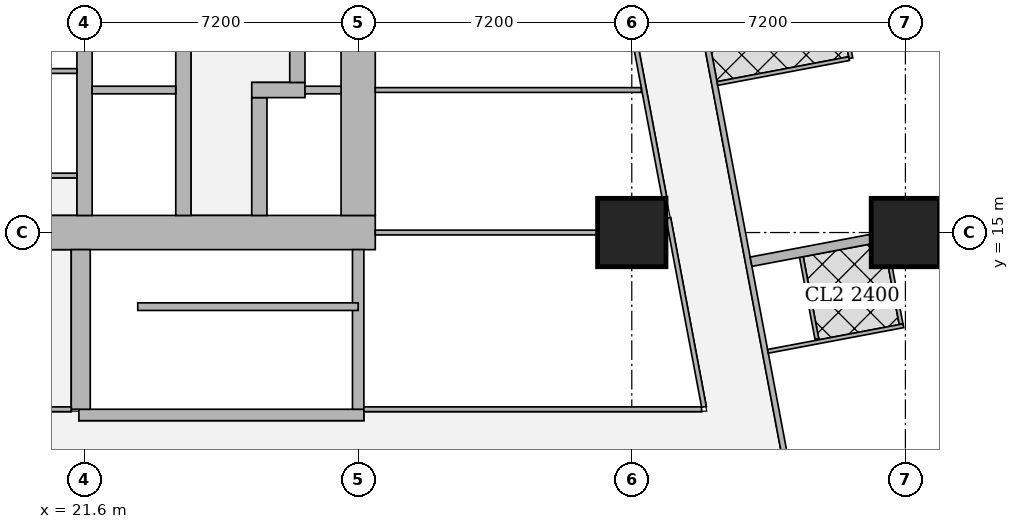
"""IFC4 building model, lengths in metres.
Left out: names, types, materials, properties, quantities, classifications, styles, units other than length and angle.
Written with IfcOpenShell. Run it as: python <this file> out.ifc"""

import sys

from ifc_helpers import new_model, si_unit, direction, frame, frame_2d, origin, origin_2d, place, context, subcontext, project, spatial, rectangle, extrude, element, fill, save


model = new_model("IFC4")
c1 = context("Model", 3, precision=1e-05, world=origin(), true_north=direction((0.0, 1.0)))
c2 = subcontext(c1, "Body", "Model", "MODEL_VIEW")
j1 = project(units=[si_unit("LENGTHUNIT", "METRE"), si_unit("PLANEANGLEUNIT", "RADIAN")], contexts=[c1])
p1 = place(None, origin())
s1 = spatial("IfcSite", under=j1, at=p1, CompositionType="ELEMENT")
p2 = place(p1, origin())
s2 = spatial("IfcBuilding", under=s1, at=p2, CompositionType="ELEMENT")
p3 = place(p2, frame((0.0, 0.0, 20.0)))
s3 = spatial("IfcBuildingStorey", under=s2, at=p3, CompositionType="ELEMENT", Elevation=20.0)
for number, where, z_axis, x_axis in (
    (1, (36.0, 15.0, 0.0), (0.0, 0.0, 1.0), (1.0, 0.0, 0.0)),
    (2, (43.2, 15.0, 0.0), (0.0, 0.0, 1.0), (1.0, 0.0, 0.0)),
):
    element("IfcColumn", number, at=place(p3, frame(where, z_axis=z_axis, x_axis=x_axis)), inside=s3, PredefinedType="COLUMN", context=c2, shape_type="SweptSolid", body=[
        extrude(rectangle(XDim=1.8, YDim=1.8, at=origin_2d()), origin(), (0.0, 0.0, 1.0), 3.75),
    ])
p4 = place(p3, frame((13.95, 15.0, 0.0), z_axis=(0.0, 0.0, 1.0), x_axis=(1.0, 0.0, 0.0)))
e3 = element("IfcWall", 3, at=p4, inside=s3, PredefinedType="SHEAR", context=c2, shape_type="SweptSolid", body=[
    extrude(rectangle(XDim=15.3, YDim=0.9, at=frame_2d((7.65, 0.0))), origin(), (0.0, 0.0, 1.0), 3.75),
])
p5 = place(p4, frame((4.45, 0.0, 0.0)))
e4 = element("IfcOpeningElement", 4, at=p5, cuts=e3, PredefinedType="OPENING", context=c2, shape_type="SweptSolid", body=[
    extrude(rectangle(XDim=1.8, YDim=2.1, at=frame_2d((0.9, 1.05))), frame((0.0, 0.46, 0.0), z_axis=(0.0, -1.0, 0.0), x_axis=(1.0, 0.0, 0.0)), (0.0, 0.0, 1.0), 0.92),
])
p6 = place(p4, frame((10.7, 0.0, 0.0)))
e5 = element("IfcOpeningElement", 5, at=p6, cuts=e3, PredefinedType="OPENING", context=c2, shape_type="SweptSolid", body=[
    extrude(rectangle(XDim=1.1, YDim=2.1, at=frame_2d((0.55, 1.05))), frame((0.0, 0.46, 0.0), z_axis=(0.0, -1.0, 0.0), x_axis=(1.0, 0.0, 0.0)), (0.0, 0.0, 1.0), 0.92),
])
p7 = place(p3, frame((28.8, 15.45, 0.0), z_axis=(0.0, 0.0, 1.0), x_axis=(0.0, 1.0, 0.0)))
e6 = element("IfcWall", 6, at=p7, inside=s3, PredefinedType="SHEAR", context=c2, shape_type="SweptSolid", body=[
    extrude(rectangle(XDim=14.1, YDim=0.9, at=frame_2d((7.05, 0.0))), origin(), (0.0, 0.0, 1.0), 3.75),
])
for number, where, z_axis, x_axis in (
    (7, (21.6, 15.45, 0.0), (0.0, 0.0, 1.0), (0.0, 1.0, 0.0)),
    (8, (24.2, 15.45, 0.0), (0.0, 0.0, 1.0), (0.0, 1.0, 0.0)),
):
    element("IfcWall", number, at=place(p3, frame(where, z_axis=z_axis, x_axis=x_axis)), inside=s3, PredefinedType="SHEAR", context=c2, shape_type="SweptSolid", body=[
        extrude(rectangle(XDim=14.1, YDim=0.4, at=frame_2d((7.05, 0.0))), origin(), (0.0, 0.0, 1.0), 3.75),
    ])
p8 = place(p3, frame((26.2, 15.45, 0.0), z_axis=(0.0, 0.0, 1.0), x_axis=(0.0, 1.0, 0.0)))
e9 = element("IfcWall", 9, at=p8, inside=s3, PredefinedType="SHEAR", context=c2, shape_type="SweptSolid", body=[
    extrude(rectangle(XDim=3.1, YDim=0.4, at=frame_2d((1.55, 0.0))), origin(), (0.0, 0.0, 1.0), 3.75),
])
p9 = place(p8, frame((0.825, 0.0, 0.0)))
e10 = element("IfcOpeningElement", 10, at=p9, cuts=e9, PredefinedType="OPENING", context=c2, shape_type="SweptSolid", body=[
    extrude(rectangle(XDim=1.2, YDim=2.1, at=frame_2d((0.6, 1.05))), frame((0.0, 0.21, 0.0), z_axis=(0.0, -1.0, 0.0), x_axis=(1.0, 0.0, 0.0)), (0.0, 0.0, 1.0), 0.42),
])
p10 = place(p3, frame((26.0, 18.75, 0.0), z_axis=(0.0, 0.0, 1.0), x_axis=(1.0, 0.0, 0.0)))
e11 = element("IfcWall", 11, at=p10, inside=s3, PredefinedType="SHEAR", context=c2, shape_type="SweptSolid", body=[
    extrude(rectangle(XDim=1.4, YDim=0.4, at=frame_2d((0.7, 0.0))), origin(), (0.0, 0.0, 1.0), 3.75),
])
p11 = place(p3, frame((27.2, 18.95, 0.0), z_axis=(0.0, 0.0, 1.0), x_axis=(0.0, 1.0, 0.0)))
e12 = element("IfcWall", 12, at=p11, inside=s3, PredefinedType="SHEAR", context=c2, shape_type="SweptSolid", body=[
    extrude(rectangle(XDim=7.1, YDim=0.4, at=frame_2d((3.55, 0.0))), origin(), (0.0, 0.0, 1.0), 3.75),
])
p12 = place(p3, frame((21.45, 10.2, 0.0), z_axis=(0.0, 0.0, 1.0), x_axis=(1.0, 0.0, 0.0)))
e13 = element("IfcWall", 13, at=p12, inside=s3, PredefinedType="SHEAR", context=c2, shape_type="SweptSolid", body=[
    extrude(rectangle(XDim=7.5, YDim=0.3, at=frame_2d((3.75, 0.0))), origin(), (0.0, 0.0, 1.0), 3.75),
])
p13 = place(p12, frame((0.5, 0.0, 0.0)))
e14 = element("IfcOpeningElement", 14, at=p13, cuts=e13, PredefinedType="OPENING", context=c2, shape_type="SweptSolid", body=[
    extrude(rectangle(XDim=1.1, YDim=2.1, at=frame_2d((0.55, 1.05))), frame((0.0, 0.16, 0.0), z_axis=(0.0, -1.0, 0.0), x_axis=(1.0, 0.0, 0.0)), (0.0, 0.0, 1.0), 0.32),
])
p14 = place(p3, frame((21.5, 10.35, 0.0), z_axis=(0.0, 0.0, 1.0), x_axis=(0.0, 1.0, 0.0)))
e15 = element("IfcWall", 15, at=p14, inside=s3, PredefinedType="SHEAR", context=c2, shape_type="SweptSolid", body=[
    extrude(rectangle(XDim=4.2, YDim=0.5, at=frame_2d((2.1, 0.0))), origin(), (0.0, 0.0, 1.0), 3.75),
])
p15 = place(p3, frame((28.8, 10.35, 0.0), z_axis=(0.0, 0.0, 1.0), x_axis=(0.0, 1.0, 0.0)))
e16 = element("IfcWall", 16, at=p15, inside=s3, PredefinedType="SHEAR", context=c2, shape_type="SweptSolid", body=[
    extrude(rectangle(XDim=4.2, YDim=0.3, at=frame_2d((2.1, 0.0))), origin(), (0.0, 0.0, 1.0), 3.75),
])
p16 = place(p3, frame((50.653, 2.703, 0.0), z_axis=(0.0, 0.0, 1.0), x_axis=(-0.185612026696, 0.982623109613, 0.0)))
e17 = element("IfcWall", 17, at=p16, inside=s3, PredefinedType="SOLIDWALL", context=c2, shape_type="SweptSolid", body=[
    extrude(rectangle(XDim=41.393, YDim=0.2, at=frame_2d((20.697, 0.0))), origin(), (0.0, 0.0, 1.0), 3.5),
])
p17 = place(p16, frame((1.633, 0.0, 0.9)))
e18 = element("IfcOpeningElement", 18, at=p17, cuts=e17, PredefinedType="OPENING", context=c2, shape_type="SweptSolid", body=[
    extrude(rectangle(XDim=1.8, YDim=1.5, at=frame_2d((0.9, 0.75))), frame((0.0, 0.11, 0.0), z_axis=(0.0, -1.0, 0.0), x_axis=(1.0, 0.0, 0.0)), (0.0, 0.0, 1.0), 0.22),
])
p18 = place(p16, frame((6.032, 0.0, 0.9)))
e19 = element("IfcOpeningElement", 19, at=p18, cuts=e17, PredefinedType="OPENING", context=c2, shape_type="SweptSolid", body=[
    extrude(rectangle(XDim=1.8, YDim=1.5, at=frame_2d((0.9, 0.75))), frame((0.0, 0.11, 0.0), z_axis=(0.0, -1.0, 0.0), x_axis=(1.0, 0.0, 0.0)), (0.0, 0.0, 1.0), 0.22),
])
p19 = place(p16, frame((9.848, 0.0, 0.9)))
e20 = element("IfcOpeningElement", 20, at=p19, cuts=e17, PredefinedType="OPENING", context=c2, shape_type="SweptSolid", body=[
    extrude(rectangle(XDim=1.8, YDim=1.5, at=frame_2d((0.9, 0.75))), frame((0.0, 0.11, 0.0), z_axis=(0.0, -1.0, 0.0), x_axis=(1.0, 0.0, 0.0)), (0.0, 0.0, 1.0), 0.22),
])
p20 = place(p16, frame((17.481, 0.0, 0.9)))
e21 = element("IfcOpeningElement", 21, at=p20, cuts=e17, PredefinedType="OPENING", context=c2, shape_type="SweptSolid", body=[
    extrude(rectangle(XDim=1.8, YDim=1.5, at=frame_2d((0.9, 0.75))), frame((0.0, 0.11, 0.0), z_axis=(0.0, -1.0, 0.0), x_axis=(1.0, 0.0, 0.0)), (0.0, 0.0, 1.0), 0.22),
])
p21 = place(p16, frame((21.297, 0.0, 0.9)))
e22 = element("IfcOpeningElement", 22, at=p21, cuts=e17, PredefinedType="OPENING", context=c2, shape_type="SweptSolid", body=[
    extrude(rectangle(XDim=1.8, YDim=1.5, at=frame_2d((0.9, 0.75))), frame((0.0, 0.11, 0.0), z_axis=(0.0, -1.0, 0.0), x_axis=(1.0, 0.0, 0.0)), (0.0, 0.0, 1.0), 0.22),
])
p22 = place(p16, frame((25.113, 0.0, 0.9)))
e23 = element("IfcOpeningElement", 23, at=p22, cuts=e17, PredefinedType="OPENING", context=c2, shape_type="SweptSolid", body=[
    extrude(rectangle(XDim=1.8, YDim=1.5, at=frame_2d((0.9, 0.75))), frame((0.0, 0.11, 0.0), z_axis=(0.0, -1.0, 0.0), x_axis=(1.0, 0.0, 0.0)), (0.0, 0.0, 1.0), 0.22),
])
p23 = place(p16, frame((28.93, 0.0, 0.9)))
e24 = element("IfcOpeningElement", 24, at=p23, cuts=e17, PredefinedType="OPENING", context=c2, shape_type="SweptSolid", body=[
    extrude(rectangle(XDim=1.8, YDim=1.5, at=frame_2d((0.9, 0.75))), frame((0.0, 0.11, 0.0), z_axis=(0.0, -1.0, 0.0), x_axis=(1.0, 0.0, 0.0)), (0.0, 0.0, 1.0), 0.22),
])
p24 = place(p16, frame((32.746, 0.0, 0.9)))
e25 = element("IfcOpeningElement", 25, at=p24, cuts=e17, PredefinedType="OPENING", context=c2, shape_type="SweptSolid", body=[
    extrude(rectangle(XDim=1.8, YDim=1.5, at=frame_2d((0.9, 0.75))), frame((0.0, 0.11, 0.0), z_axis=(0.0, -1.0, 0.0), x_axis=(1.0, 0.0, 0.0)), (0.0, 0.0, 1.0), 0.22),
])
p25 = place(p16, frame((36.481, 0.0, 0.9)))
e26 = element("IfcOpeningElement", 26, at=p25, cuts=e17, PredefinedType="OPENING", context=c2, shape_type="SweptSolid", body=[
    extrude(rectangle(XDim=1.8, YDim=1.5, at=frame_2d((0.9, 0.75))), frame((0.0, 0.11, 0.0), z_axis=(0.0, -1.0, 0.0), x_axis=(1.0, 0.0, 0.0)), (0.0, 0.0, 1.0), 0.22),
])
p26 = place(p3, frame((33.755, 42.325, 0.0), z_axis=(0.0, 0.0, 1.0), x_axis=(0.185611461091, -0.982623216453, 0.0)))
e27 = element("IfcWall", 27, at=p26, inside=s3, PredefinedType="SOLIDWALL", context=c2, shape_type="SweptSolid", body=[
    extrude(rectangle(XDim=40.241, YDim=0.15, at=frame_2d((20.121, 0.0))), origin(), (0.0, 0.0, 1.0), 2.5),
])
p27 = place(p26, frame((7.325, 0.0, 0.0)))
e28 = element("IfcOpeningElement", 28, at=p27, cuts=e27, PredefinedType="OPENING", context=c2, shape_type="SweptSolid", body=[
    extrude(rectangle(XDim=1.0, YDim=2.1, at=frame_2d((0.5, 1.05))), frame((0.0, 0.085, 0.0), z_axis=(0.0, -1.0, 0.0), x_axis=(1.0, 0.0, 0.0)), (0.0, 0.0, 1.0), 0.17),
])
p28 = place(p26, frame((11.902, 0.0, 0.0)))
e29 = element("IfcOpeningElement", 29, at=p28, cuts=e27, PredefinedType="OPENING", context=c2, shape_type="SweptSolid", body=[
    extrude(rectangle(XDim=1.0, YDim=2.1, at=frame_2d((0.5, 1.05))), frame((0.0, 0.085, 0.0), z_axis=(0.0, -1.0, 0.0), x_axis=(1.0, 0.0, 0.0)), (0.0, 0.0, 1.0), 0.17),
])
p29 = place(p26, frame((25.718, 0.0, 0.0)))
e30 = element("IfcOpeningElement", 30, at=p29, cuts=e27, PredefinedType="OPENING", context=c2, shape_type="SweptSolid", body=[
    extrude(rectangle(XDim=1.0, YDim=2.1, at=frame_2d((0.5, 1.05))), frame((0.0, 0.085, 0.0), z_axis=(0.0, -1.0, 0.0), x_axis=(1.0, 0.0, 0.0)), (0.0, 0.0, 1.0), 0.17),
])
p30 = place(p26, frame((31.788, 0.0, 0.0)))
e31 = element("IfcOpeningElement", 31, at=p30, cuts=e27, PredefinedType="OPENING", context=c2, shape_type="SweptSolid", body=[
    extrude(rectangle(XDim=1.0, YDim=2.1, at=frame_2d((0.5, 1.05))), frame((0.0, 0.085, 0.0), z_axis=(0.0, -1.0, 0.0), x_axis=(1.0, 0.0, 0.0)), (0.0, 0.0, 1.0), 0.17),
])
p31 = place(p3, frame((41.437, 21.319, 0.0), z_axis=(0.0, 0.0, 1.0), x_axis=(0.185783379659, -0.98259072652, 0.0)))
e32 = element("IfcWall", 32, at=p31, inside=s3, PredefinedType="PARTITIONING", context=c2, shape_type="SweptSolid", body=[
    extrude(rectangle(XDim=1.765, YDim=0.1, at=frame_2d((0.882, 0.0))), origin(), (0.0, 0.0, 1.0), 3.5),
])
p32 = place(p31, frame((0.374, 0.0, 0.0)))
e33 = element("IfcOpeningElement", 33, at=p32, cuts=e32, PredefinedType="OPENING", context=c2, shape_type="SweptSolid", body=[
    extrude(rectangle(XDim=0.9, YDim=2.1, at=frame_2d((0.45, 1.05))), frame((0.0, 0.06, 0.0), z_axis=(0.0, -1.0, 0.0), x_axis=(1.0, 0.0, 0.0)), (0.0, 0.0, 1.0), 0.12),
])
p33 = place(p3, frame((41.716, 19.576, 0.0), z_axis=(0.0, 0.0, 1.0), x_axis=(-0.982588017646, -0.185797706064, 0.0)))
e34 = element("IfcWall", 34, at=p33, inside=s3, PredefinedType="PARTITIONING", context=c2, shape_type="SweptSolid", body=[
    extrude(rectangle(XDim=3.525, YDim=0.1, at=frame_2d((1.763, 0.0))), origin(), (0.0, 0.0, 1.0), 3.5),
])
p34 = place(p3, frame((42.803, 14.09, 0.0), z_axis=(0.0, 0.0, 1.0), x_axis=(0.185608486942, -0.982623778246, 0.0)))
e35 = element("IfcWall", 35, at=p34, inside=s3, PredefinedType="PARTITIONING", context=c2, shape_type="SweptSolid", body=[
    extrude(rectangle(XDim=1.53, YDim=0.1, at=frame_2d((0.765, 0.0))), origin(), (0.0, 0.0, 1.0), 3.5),
])
p35 = place(p34, frame((0.48, 0.0, 0.0)))
e36 = element("IfcOpeningElement", 36, at=p35, cuts=e35, PredefinedType="OPENING", context=c2, shape_type="SweptSolid", body=[
    extrude(rectangle(XDim=0.9, YDim=2.1, at=frame_2d((0.45, 1.05))), frame((0.0, 0.06, 0.0), z_axis=(0.0, -1.0, 0.0), x_axis=(1.0, 0.0, 0.0)), (0.0, 0.0, 1.0), 0.12),
])
p36 = place(p3, frame((43.145, 12.547, 0.0), z_axis=(0.0, 0.0, 1.0), x_axis=(-0.982610451136, -0.185679027675, 0.0)))
e37 = element("IfcWall", 37, at=p36, inside=s3, PredefinedType="PARTITIONING", context=c2, shape_type="SweptSolid", body=[
    extrude(rectangle(XDim=3.625, YDim=0.1, at=frame_2d((1.812, 0.0))), origin(), (0.0, 0.0, 1.0), 3.5),
])
p37 = place(p36, frame((2.55, 0.0, 0.0)))
e38 = element("IfcOpeningElement", 38, at=p37, cuts=e37, PredefinedType="OPENING", context=c2, shape_type="SweptSolid", body=[
    extrude(rectangle(XDim=0.9, YDim=2.1, at=frame_2d((0.45, 1.05))), frame((0.0, 0.06, 0.0), z_axis=(0.0, -1.0, 0.0), x_axis=(1.0, 0.0, 0.0)), (0.0, 0.0, 1.0), 0.12),
])
p38 = place(p3, frame((40.463, 14.355, 0.0), z_axis=(0.0, 0.0, 1.0), x_axis=(0.185760900029, -0.98259497659, 0.0)))
e39 = element("IfcWall", 39, at=p38, inside=s3, PredefinedType="PARTITIONING", context=c2, shape_type="SweptSolid", body=[
    extrude(rectangle(XDim=2.192, YDim=0.1, at=frame_2d((1.096, 0.0))), origin(), (0.0, 0.0, 1.0), 3.5),
])
p39 = place(p3, frame((42.276, 14.825, 0.0), z_axis=(0.0, 0.0, 1.0), x_axis=(-0.982607211054, -0.185696173318, 0.0)))
e40 = element("IfcWall", 40, at=p39, inside=s3, PredefinedType="SOLIDWALL", context=c2, shape_type="SweptSolid", body=[
    extrude(rectangle(XDim=3.194, YDim=0.25, at=frame_2d((1.597, 0.0))), origin(), (0.0, 0.0, 1.0), 3.5),
])
p40 = place(p3, frame((10.413, 10.35, 0.0), z_axis=(0.0, 0.0, 1.0), x_axis=(1.0, 0.0, 0.0)))
e41 = element("IfcWall", 41, at=p40, inside=s3, PredefinedType="PARTITIONING", context=c2, shape_type="SweptSolid", body=[
    extrude(rectangle(XDim=10.837, YDim=0.125, at=frame_2d((5.418, 0.0))), origin(), (0.0, 0.0, 1.0), 3.5),
])
p41 = place(p40, frame((7.582, 0.0, 0.0)))
e42 = element("IfcOpeningElement", 42, at=p41, cuts=e41, PredefinedType="OPENING", context=c2, shape_type="SweptSolid", body=[
    extrude(rectangle(XDim=1.8, YDim=2.1, at=frame_2d((0.9, 1.05))), frame((0.0, 0.073, 0.0), z_axis=(0.0, -1.0, 0.0), x_axis=(1.0, 0.0, 0.0)), (0.0, 0.0, 1.0), 0.145),
])
p42 = place(p3, frame((28.95, 10.35, 0.0), z_axis=(0.0, 0.0, 1.0), x_axis=(1.0, 0.0, 0.0)))
e43 = element("IfcWall", 43, at=p42, inside=s3, PredefinedType="PARTITIONING", context=c2, shape_type="SweptSolid", body=[
    extrude(rectangle(XDim=8.886, YDim=0.125, at=frame_2d((4.443, 0.0))), origin(), (0.0, 0.0, 1.0), 3.5),
])
p43 = place(p3, frame((37.9, 10.413, 0.0), z_axis=(0.0, 0.0, 1.0), x_axis=(-0.185527510388, 0.982639070508, 0.0)))
e44 = element("IfcWall", 44, at=p43, inside=s3, PredefinedType="PARTITIONING", context=c2, shape_type="SweptSolid", body=[
    extrude(rectangle(XDim=5.056, YDim=0.125, at=frame_2d((2.528, 0.0))), origin(), (0.0, 0.0, 1.0), 3.5),
])
p44 = place(p43, frame((0.708, 0.0, 0.0)))
e45 = element("IfcOpeningElement", 45, at=p44, cuts=e44, PredefinedType="OPENING", context=c2, shape_type="SweptSolid", body=[
    extrude(rectangle(XDim=1.0, YDim=2.1, at=frame_2d((0.5, 1.05))), frame((0.0, 0.073, 0.0), z_axis=(0.0, -1.0, 0.0), x_axis=(1.0, 0.0, 0.0)), (0.0, 0.0, 1.0), 0.145),
])
p45 = place(p3, frame((36.861, 15.913, 0.0), z_axis=(0.0, 0.0, 1.0), x_axis=(-0.185598960122, 0.982625577726, 0.0)))
e46 = element("IfcWall", 46, at=p45, inside=s3, PredefinedType="PARTITIONING", context=c2, shape_type="SweptSolid", body=[
    extrude(rectangle(XDim=6.703, YDim=0.125, at=frame_2d((3.352, 0.0))), origin(), (0.0, 0.0, 1.0), 2.5),
])
p46 = place(p45, frame((0.25, 0.0, 0.0)))
e47 = element("IfcOpeningElement", 47, at=p46, cuts=e46, PredefinedType="OPENING", context=c2, shape_type="SweptSolid", body=[
    extrude(rectangle(XDim=1.0, YDim=2.1, at=frame_2d((0.5, 1.05))), frame((0.0, 0.073, 0.0), z_axis=(0.0, -1.0, 0.0), x_axis=(1.0, 0.0, 0.0)), (0.0, 0.0, 1.0), 0.145),
])
p47 = place(p45, frame((3.71, 0.0, 0.0)))
e48 = element("IfcOpeningElement", 48, at=p47, cuts=e46, PredefinedType="OPENING", context=c2, shape_type="SweptSolid", body=[
    extrude(rectangle(XDim=1.0, YDim=2.1, at=frame_2d((0.5, 1.05))), frame((0.0, 0.073, 0.0), z_axis=(0.0, -1.0, 0.0), x_axis=(1.0, 0.0, 0.0)), (0.0, 0.0, 1.0), 0.145),
])
p48 = place(p3, frame((29.25, 15.0, 0.0), z_axis=(0.0, 0.0, 1.0), x_axis=(1.0, 0.0, 0.0)))
e49 = element("IfcWall", 49, at=p48, inside=s3, PredefinedType="PARTITIONING", context=c2, shape_type="SweptSolid", body=[
    extrude(rectangle(XDim=5.849, YDim=0.125, at=frame_2d((2.925, 0.0))), origin(), (0.0, 0.0, 1.0), 3.5),
])
p49 = place(p3, frame((36.901, 15.0, 0.0), z_axis=(0.0, 0.0, 1.0), x_axis=(1.0, 0.0, 0.0)))
e50 = element("IfcWall", 50, at=p49, inside=s3, PredefinedType="PARTITIONING", context=c2, shape_type="SweptSolid", body=[
    extrude(rectangle(XDim=0.057, YDim=0.125, at=frame_2d((0.029, 0.0))), origin(), (0.0, 0.0, 1.0), 3.5),
])
p50 = place(p3, frame((29.25, 18.75, 0.0), z_axis=(0.0, 0.0, 1.0), x_axis=(1.0, 0.0, 0.0)))
e51 = element("IfcWall", 51, at=p50, inside=s3, PredefinedType="PARTITIONING", context=c2, shape_type="SweptSolid", body=[
    extrude(rectangle(XDim=7.0, YDim=0.125, at=frame_2d((3.5, 0.0))), origin(), (0.0, 0.0, 1.0), 3.5),
])
for number, where, z_axis, x_axis in (
    (52, (20.363, 16.5, 0.0), (0.0, 0.0, 1.0), (1.0, 0.0, 0.0)),
    (53, (20.363, 19.25, 0.0), (0.0, 0.0, 1.0), (1.0, 0.0, 0.0)),
):
    element("IfcWall", number, at=place(p3, frame(where, z_axis=z_axis, x_axis=x_axis)), inside=s3, PredefinedType="PARTITIONING", context=c2, shape_type="SweptSolid", body=[
        extrude(rectangle(XDim=1.037, YDim=0.125, at=frame_2d((0.519, 0.0))), origin(), (0.0, 0.0, 1.0), 3.5),
    ])
p51 = place(p3, frame((23.0, 13.05, 0.0), z_axis=(0.0, 0.0, 1.0), x_axis=(1.0, 0.0, 0.0)))
e54 = element("IfcWall", 54, at=p51, inside=s3, PredefinedType="SHEAR", context=c2, shape_type="SweptSolid", body=[
    extrude(rectangle(XDim=5.8, YDim=0.2, at=frame_2d((2.9, 0.0))), origin(), (0.0, 0.0, 1.0), 3.75),
])
p52 = place(p3, frame((21.8, 18.75, 0.0), z_axis=(0.0, 0.0, 1.0), x_axis=(1.0, 0.0, 0.0)))
e55 = element("IfcWall", 55, at=p52, inside=s3, PredefinedType="SOLIDWALL", context=c2, shape_type="SweptSolid", body=[
    extrude(rectangle(XDim=2.2, YDim=0.2, at=frame_2d((1.1, 0.0))), origin(), (0.0, 0.0, 1.0), 3.5),
])
p53 = place(p3, frame((27.4, 18.75, 0.0), z_axis=(0.0, 0.0, 1.0), x_axis=(1.0, 0.0, 0.0)))
e56 = element("IfcWall", 56, at=p53, inside=s3, PredefinedType="SOLIDWALL", context=c2, shape_type="SweptSolid", body=[
    extrude(rectangle(XDim=0.95, YDim=0.2, at=frame_2d((0.475, 0.0))), origin(), (0.0, 0.0, 1.0), 3.5),
])
p54 = place(p29, origin())
e57 = element("IfcDoor", 57, at=p54, inside=s3, OperationType="SINGLE_SWING_RIGHT", PredefinedType="DOOR", context=c2, shape_type="SweptSolid", body=[
    extrude(rectangle(XDim=1.0, YDim=2.1, at=frame_2d((0.5, 1.05))), frame((0.0, 0.025, 0.0), z_axis=(0.0, -1.0, 0.0), x_axis=(1.0, 0.0, 0.0)), (0.0, 0.0, 1.0), 0.05),
])
fill(e30, e57)
p55 = place(p35, origin())
e58 = element("IfcDoor", 58, at=p55, inside=s3, OperationType="SINGLE_SWING_LEFT", PredefinedType="DOOR", context=c2, shape_type="SweptSolid", body=[
    extrude(rectangle(XDim=0.9, YDim=2.1, at=frame_2d((0.45, 1.05))), frame((0.0, 0.025, 0.0), z_axis=(0.0, -1.0, 0.0), x_axis=(1.0, 0.0, 0.0)), (0.0, 0.0, 1.0), 0.05),
])
fill(e36, e58)
p56 = place(p37, origin())
e59 = element("IfcDoor", 59, at=p56, inside=s3, OperationType="SINGLE_SWING_LEFT", PredefinedType="DOOR", context=c2, shape_type="SweptSolid", body=[
    extrude(rectangle(XDim=0.9, YDim=2.1, at=frame_2d((0.45, 1.05))), frame((0.0, 0.025, 0.0), z_axis=(0.0, -1.0, 0.0), x_axis=(1.0, 0.0, 0.0)), (0.0, 0.0, 1.0), 0.05),
])
fill(e38, e59)
p57 = place(p30, origin())
e60 = element("IfcDoor", 60, at=p57, inside=s3, OperationType="SINGLE_SWING_RIGHT", PredefinedType="DOOR", context=c2, shape_type="SweptSolid", body=[
    extrude(rectangle(XDim=1.0, YDim=2.1, at=frame_2d((0.5, 1.05))), frame((0.0, 0.025, 0.0), z_axis=(0.0, -1.0, 0.0), x_axis=(1.0, 0.0, 0.0)), (0.0, 0.0, 1.0), 0.05),
])
fill(e31, e60)
p58 = place(p44, origin())
e61 = element("IfcDoor", 61, at=p58, inside=s3, OperationType="SINGLE_SWING_LEFT", PredefinedType="DOOR", context=c2, shape_type="SweptSolid", body=[
    extrude(rectangle(XDim=1.0, YDim=2.1, at=frame_2d((0.5, 1.05))), frame((0.0, 0.025, 0.0), z_axis=(0.0, -1.0, 0.0), x_axis=(1.0, 0.0, 0.0)), (0.0, 0.0, 1.0), 0.05),
])
fill(e45, e61)
p59 = place(p46, origin())
e62 = element("IfcDoor", 62, at=p59, inside=s3, OperationType="SINGLE_SWING_LEFT", PredefinedType="DOOR", context=c2, shape_type="SweptSolid", body=[
    extrude(rectangle(XDim=1.0, YDim=2.1, at=frame_2d((0.5, 1.05))), frame((0.0, 0.025, 0.0), z_axis=(0.0, -1.0, 0.0), x_axis=(1.0, 0.0, 0.0)), (0.0, 0.0, 1.0), 0.05),
])
fill(e47, e62)
p60 = place(p47, origin())
e63 = element("IfcDoor", 63, at=p60, inside=s3, OperationType="SINGLE_SWING_LEFT", PredefinedType="DOOR", context=c2, shape_type="SweptSolid", body=[
    extrude(rectangle(XDim=1.0, YDim=2.1, at=frame_2d((0.5, 1.05))), frame((0.0, 0.025, 0.0), z_axis=(0.0, -1.0, 0.0), x_axis=(1.0, 0.0, 0.0)), (0.0, 0.0, 1.0), 0.05),
])
fill(e48, e63)
p61 = place(p6, origin())
e64 = element("IfcDoor", 64, at=p61, inside=s3, OperationType="SINGLE_SWING_RIGHT", PredefinedType="DOOR", context=c2, shape_type="SweptSolid", body=[
    extrude(rectangle(XDim=1.1, YDim=2.1, at=frame_2d((0.55, 1.05))), frame((0.0, 0.025, 0.0), z_axis=(0.0, -1.0, 0.0), x_axis=(1.0, 0.0, 0.0)), (0.0, 0.0, 1.0), 0.05),
])
fill(e5, e64)
p62 = place(p9, origin())
e65 = element("IfcDoor", 65, at=p62, inside=s3, OperationType="DOUBLE_DOOR_SLIDING", PredefinedType="DOOR", context=c2, shape_type="SweptSolid", body=[
    extrude(rectangle(XDim=1.2, YDim=2.1, at=frame_2d((0.6, 1.05))), frame((0.0, 0.025, 0.0), z_axis=(0.0, -1.0, 0.0), x_axis=(1.0, 0.0, 0.0)), (0.0, 0.0, 1.0), 0.05),
])
fill(e10, e65)
p63 = place(p13, origin())
e66 = element("IfcDoor", 66, at=p63, inside=s3, OperationType="SINGLE_SWING_LEFT", PredefinedType="DOOR", context=c2, shape_type="SweptSolid", body=[
    extrude(rectangle(XDim=1.1, YDim=2.1, at=frame_2d((0.55, 1.05))), frame((0.0, 0.025, 0.0), z_axis=(0.0, -1.0, 0.0), x_axis=(1.0, 0.0, 0.0)), (0.0, 0.0, 1.0), 0.05),
])
fill(e14, e66)
save(model, sys.argv[1])
